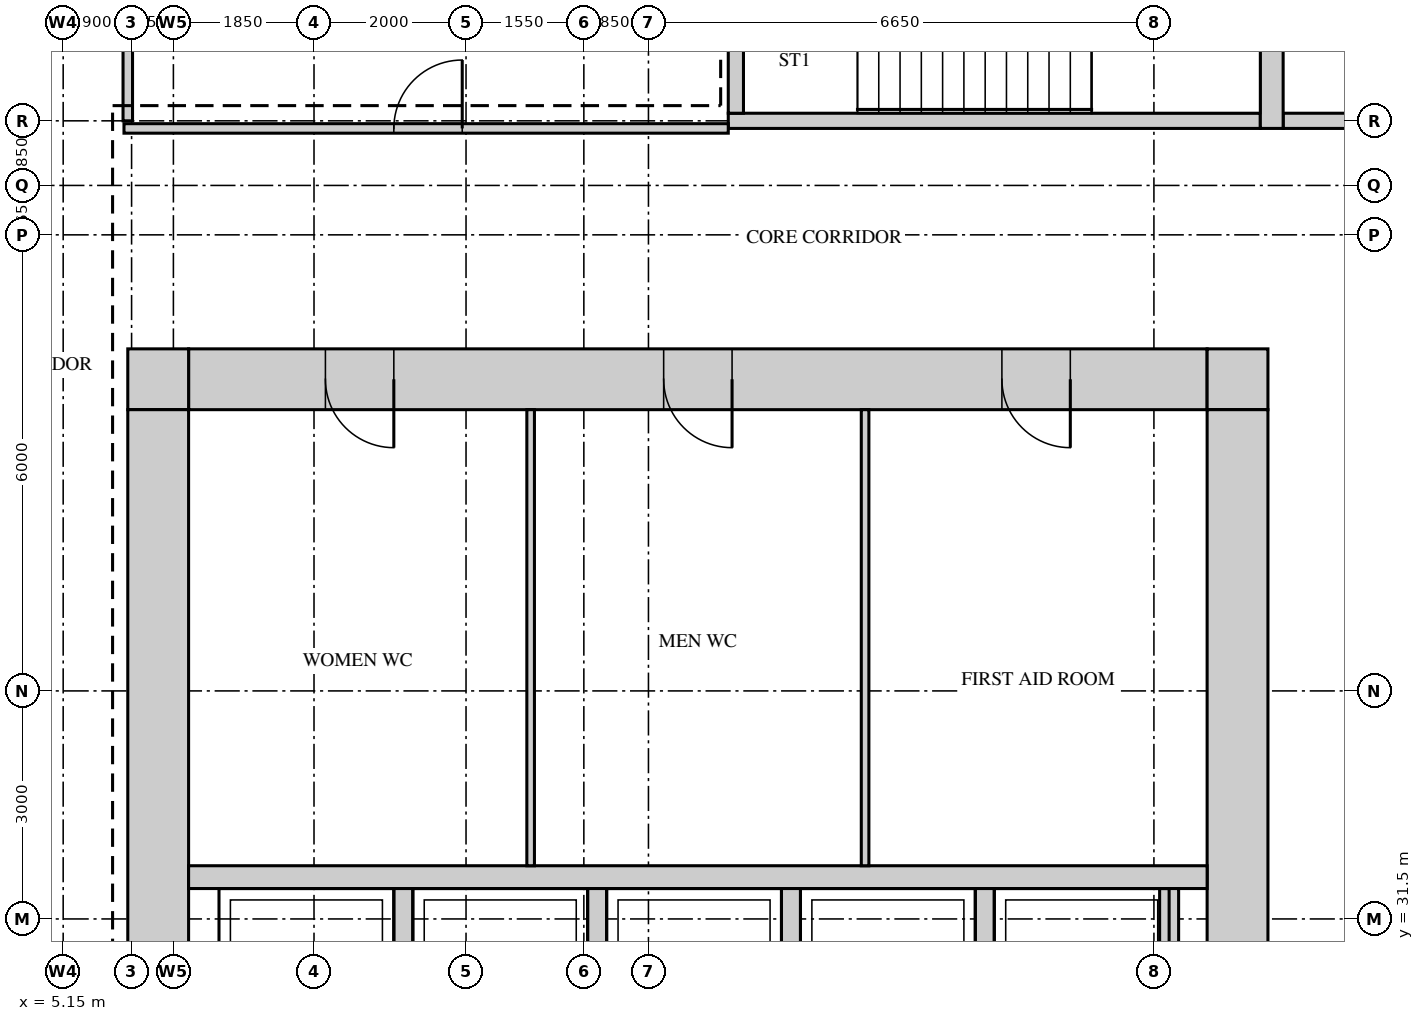
"""IFC4 building model, lengths in metres.
Left out: names, types, materials, properties, quantities, classifications, styles, units other than length and angle.
Written with IfcOpenShell. Run it as: python <this file> out.ifc"""

import sys

from ifc_helpers import new_model, si_unit, direction, frame, frame_2d, origin, place, context, subcontext, project, spatial, rectangle, extrude, source, transform, mapped, element, fill, save


model = new_model("IFC4")
c1 = context("Model", 3, precision=1e-05, world=origin(), true_north=direction((0.0, 1.0)))
c2 = subcontext(c1, "Body", "Model", "MODEL_VIEW")
j1 = project(units=[si_unit("LENGTHUNIT", "METRE"), si_unit("PLANEANGLEUNIT", "RADIAN")], contexts=[c1])
p1 = place(None, origin())
s1 = spatial("IfcSite", under=j1, at=p1, CompositionType="ELEMENT")
p2 = place(p1, origin())
s2 = spatial("IfcBuilding", under=s1, at=p2, CompositionType="ELEMENT")
p3 = place(p2, frame((0.0, 0.0, 200.7)))
s3 = spatial("IfcBuildingStorey", under=s2, at=p3, CompositionType="ELEMENT", Elevation=200.7)
m1 = source(origin(), c2, "Body", "SweptSolid", [
    extrude(rectangle(XDim=13.4, YDim=0.8, at=frame_2d((6.7, 0.0))), origin(), (0.0, 0.0, 1.0), 3.75),
])
p4 = place(p3, frame((6.8, 38.6, 0.0), z_axis=(0.0, 0.0, 1.0), x_axis=(1.0, 0.0, 0.0)))
e1 = element("IfcWall", 1, at=p4, inside=s3, PredefinedType="SHEAR", context=c2, shape_type="MappedRepresentation", body=[
    mapped(m1, transform((0.0, 0.0, 0.0))),
])
m2 = source(origin(), c2, "Body", "SweptSolid", [
    extrude(rectangle(XDim=0.9, YDim=2.1, at=frame_2d((0.45, 1.05))), frame((0.0, 0.41, 0.0), z_axis=(0.0, -1.0, 0.0), x_axis=(1.0, 0.0, 0.0)), (0.0, 0.0, 1.0), 0.82),
])
p5 = place(p4, frame((1.8, 0.0, 0.0)))
e2 = element("IfcOpeningElement", 2, at=p5, cuts=e1, PredefinedType="OPENING", context=c2, shape_type="MappedRepresentation", body=[
    mapped(m2, transform((0.0, 0.0, 0.0))),
])
p6 = place(p4, frame((6.25, 0.0, 0.0)))
e3 = element("IfcOpeningElement", 3, at=p6, cuts=e1, PredefinedType="OPENING", context=c2, shape_type="MappedRepresentation", body=[
    mapped(m2, transform((0.0, 0.0, 0.0))),
])
p7 = place(p4, frame((10.7, 0.0, 0.0)))
e4 = element("IfcOpeningElement", 4, at=p7, cuts=e1, PredefinedType="OPENING", context=c2, shape_type="MappedRepresentation", body=[
    mapped(m2, transform((0.0, 0.0, 0.0))),
])
m3 = source(origin(), c2, "Body", "SweptSolid", [
    extrude(rectangle(XDim=0.8, YDim=0.8, at=frame_2d((0.4, 0.0))), origin(), (0.0, 0.0, 1.0), 3.75),
])
for number, where, z_axis, x_axis in (
    (5, (20.2, 38.6, 0.0), (0.0, 0.0, 1.0), (1.0, 0.0, 0.0)),
    (6, (6.0, 38.6, 0.0), (0.0, 0.0, 1.0), (1.0, 0.0, 0.0)),
):
    element("IfcWall", number, at=place(p3, frame(where, z_axis=z_axis, x_axis=x_axis)), inside=s3, PredefinedType="SHEAR", context=c2, shape_type="MappedRepresentation", body=[
        mapped(m3, transform((0.0, 0.0, 0.0))),
    ])
m4 = source(origin(), c2, "Body", "SweptSolid", [
    extrude(rectangle(XDim=22.4, YDim=0.8, at=frame_2d((11.2, 0.0))), origin(), (0.0, 0.0, 1.0), 3.75),
])
p8 = place(p3, frame((20.6, 15.8, 0.0), z_axis=(0.0, 0.0, 1.0), x_axis=(0.0, 1.0, 0.0)))
e7 = element("IfcWall", 7, at=p8, inside=s3, PredefinedType="SHEAR", context=c2, shape_type="MappedRepresentation", body=[
    mapped(m4, transform((0.0, 0.0, 0.0))),
])
m5 = source(origin(), c2, "Body", "SweptSolid", [
    extrude(rectangle(XDim=1.8, YDim=2.1, at=frame_2d((0.9, 1.05))), frame((0.0, 0.41, 0.0), z_axis=(0.0, -1.0, 0.0), x_axis=(1.0, 0.0, 0.0)), (0.0, 0.0, 1.0), 0.82),
])
p9 = place(p8, frame((10.7, 0.0, 0.0)))
e8 = element("IfcOpeningElement", 8, at=p9, cuts=e7, PredefinedType="OPENING", context=c2, shape_type="MappedRepresentation", body=[
    mapped(m5, transform((0.0, 0.0, 0.0))),
])
p10 = place(p8, frame((0.35, 0.0, 0.0)))
e9 = element("IfcOpeningElement", 9, at=p10, cuts=e7, PredefinedType="OPENING", context=c2, shape_type="MappedRepresentation", body=[
    mapped(m2, transform((0.0, 0.0, 0.0))),
])
p11 = place(p8, frame((2.8, 0.0, 0.0)))
e10 = element("IfcOpeningElement", 10, at=p11, cuts=e7, PredefinedType="OPENING", context=c2, shape_type="MappedRepresentation", body=[
    mapped(m2, transform((0.0, 0.0, 0.0))),
])
m6 = source(origin(), c2, "Body", "SweptSolid", [
    extrude(rectangle(XDim=1.0, YDim=2.1, at=frame_2d((0.5, 1.05))), frame((0.0, 0.41, 0.0), z_axis=(0.0, -1.0, 0.0), x_axis=(1.0, 0.0, 0.0)), (0.0, 0.0, 1.0), 0.82),
])
p12 = place(p8, frame((5.5, 0.0, 0.0)))
e11 = element("IfcOpeningElement", 11, at=p12, cuts=e7, PredefinedType="OPENING", context=c2, shape_type="MappedRepresentation", body=[
    mapped(m6, transform((0.0, 0.0, 0.0))),
])
p13 = place(p3, frame((6.4, 15.8, 0.0), z_axis=(0.0, 0.0, 1.0), x_axis=(0.0, 1.0, 0.0)))
e12 = element("IfcWall", 12, at=p13, inside=s3, PredefinedType="SHEAR", context=c2, shape_type="MappedRepresentation", body=[
    mapped(m4, transform((0.0, 0.0, 0.0))),
])
m7 = source(origin(), c2, "Body", "SweptSolid", [
    extrude(rectangle(XDim=7.0, YDim=0.2, at=frame_2d((3.5, 0.0))), origin(), (0.0, 0.0, 1.0), 3.75),
])
p14 = place(p3, frame((13.9, 42.0, 0.0), z_axis=(0.0, 0.0, 1.0), x_axis=(1.0, 0.0, 0.0)))
e13 = element("IfcWall", 13, at=p14, inside=s3, PredefinedType="SHEAR", context=c2, shape_type="MappedRepresentation", body=[
    mapped(m7, transform((0.0, 0.0, 0.0))),
])
m8 = source(origin(), c2, "Body", "SweptSolid", [
    extrude(rectangle(XDim=7.1, YDim=0.2, at=frame_2d((3.55, 0.0))), origin(), (0.0, 0.0, 1.0), 3.75),
])
p15 = place(p3, frame((21.2, 42.0, 0.0), z_axis=(0.0, 0.0, 1.0), x_axis=(1.0, 0.0, 0.0)))
e14 = element("IfcWall", 14, at=p15, inside=s3, PredefinedType="SHEAR", context=c2, shape_type="MappedRepresentation", body=[
    mapped(m8, transform((0.0, 0.0, 0.0))),
])
m9 = source(origin(), c2, "Body", "SweptSolid", [
    extrude(rectangle(XDim=3.75, YDim=0.3, at=frame_2d((1.875, 0.0))), origin(), (0.0, 0.0, 1.0), 3.75),
])
p16 = place(p3, frame((21.05, 41.9, 0.0), z_axis=(0.0, 0.0, 1.0), x_axis=(0.0, 1.0, 0.0)))
e15 = element("IfcWall", 15, at=p16, inside=s3, PredefinedType="SHEAR", context=c2, shape_type="MappedRepresentation", body=[
    mapped(m9, transform((0.0, 0.0, 0.0))),
])
m10 = source(origin(), c2, "Body", "SweptSolid", [
    extrude(rectangle(XDim=3.35, YDim=0.2, at=frame_2d((1.675, 0.0))), origin(), (0.0, 0.0, 1.0), 3.75),
])
p17 = place(p3, frame((14.0, 42.1, 0.0), z_axis=(0.0, 0.0, 1.0), x_axis=(0.0, 1.0, 0.0)))
e16 = element("IfcWall", 16, at=p17, inside=s3, PredefinedType="SHEAR", context=c2, shape_type="MappedRepresentation", body=[
    mapped(m10, transform((0.0, 0.0, 0.0))),
])
m11 = source(origin(), c2, "Body", "SweptSolid", [
    extrude(rectangle(XDim=13.4, YDim=0.3, at=frame_2d((6.7, 0.0))), origin(), (0.0, 0.0, 1.0), 3.75),
])
p18 = place(p3, frame((6.8, 32.05, 0.0), z_axis=(0.0, 0.0, 1.0), x_axis=(1.0, 0.0, 0.0)))
e17 = element("IfcWall", 17, at=p18, inside=s3, PredefinedType="STANDARD", context=c2, shape_type="MappedRepresentation", body=[
    mapped(m11, transform((0.0, 0.0, 0.0))),
])
m12 = source(origin(), c2, "Body", "SweptSolid", [
    extrude(rectangle(XDim=2.4, YDim=0.25, at=frame_2d((1.2, 0.0))), origin(), (0.0, 0.0, 1.0), 3.75),
])
for number, where, z_axis, x_axis in (
    (18, (17.275, 29.5, 0.0), (0.0, 0.0, 1.0), (0.0, 1.0, 0.0)),
    (19, (19.7, 29.5, 0.0), (0.0, 0.0, 1.0), (0.0, 1.0, 0.0)),
    (20, (9.625, 29.5, 0.0), (0.0, 0.0, 1.0), (0.0, 1.0, 0.0)),
    (21, (12.175, 29.5, 0.0), (0.0, 0.0, 1.0), (0.0, 1.0, 0.0)),
    (22, (14.725, 29.5, 0.0), (0.0, 0.0, 1.0), (0.0, 1.0, 0.0)),
):
    element("IfcWall", number, at=place(p3, frame(where, z_axis=z_axis, x_axis=x_axis)), inside=s3, PredefinedType="STANDARD", context=c2, shape_type="MappedRepresentation", body=[
        mapped(m12, transform((0.0, 0.0, 0.0))),
    ])
m13 = source(origin(), c2, "Body", "SweptSolid", [
    extrude(rectangle(XDim=6.0, YDim=0.1, at=frame_2d((3.0, 0.0))), origin(), (0.0, 0.0, 1.0), 3.8),
])
for number, where, z_axis, x_axis in (
    (23, (11.3, 32.2, 0.0), (0.0, 0.0, 1.0), (0.0, 1.0, 0.0)),
    (24, (15.7, 32.2, 0.0), (0.0, 0.0, 1.0), (0.0, 1.0, 0.0)),
):
    element("IfcWall", number, at=place(p3, frame(where, z_axis=z_axis, x_axis=x_axis)), inside=s3, PredefinedType="PARTITIONING", context=c2, shape_type="MappedRepresentation", body=[
        mapped(m13, transform((0.0, 0.0, 0.0))),
    ])
m14 = source(origin(), c2, "Body", "SweptSolid", [
    extrude(rectangle(XDim=7.95, YDim=0.125, at=frame_2d((3.975, 0.0))), origin(), (0.0, 0.0, 1.0), 3.8),
])
p19 = place(p3, frame((5.95, 41.9, 0.0), z_axis=(0.0, 0.0, 1.0), x_axis=(1.0, 0.0, 0.0)))
e25 = element("IfcWall", 25, at=p19, inside=s3, PredefinedType="PARTITIONING", context=c2, shape_type="MappedRepresentation", body=[
    mapped(m14, transform((0.0, 0.0, 0.0))),
])
m15 = source(origin(), c2, "Body", "SweptSolid", [
    extrude(rectangle(XDim=0.9, YDim=2.1, at=frame_2d((0.45, 1.05))), frame((0.0, 0.073, 0.0), z_axis=(0.0, -1.0, 0.0), x_axis=(1.0, 0.0, 0.0)), (0.0, 0.0, 1.0), 0.145),
])
p20 = place(p19, frame((3.55, 0.0, 0.0)))
e26 = element("IfcOpeningElement", 26, at=p20, cuts=e25, PredefinedType="OPENING", context=c2, shape_type="MappedRepresentation", body=[
    mapped(m15, transform((0.0, 0.0, 0.0))),
])
m16 = source(origin(), c2, "Body", "SweptSolid", [
    extrude(rectangle(XDim=3.45, YDim=0.125, at=frame_2d((1.725, 0.0))), origin(), (0.0, 0.0, 1.0), 3.8),
])
p21 = place(p3, frame((6.0, 42.0, 0.0), z_axis=(0.0, 0.0, 1.0), x_axis=(0.0, 1.0, 0.0)))
e27 = element("IfcWall", 27, at=p21, inside=s3, PredefinedType="PARTITIONING", context=c2, shape_type="MappedRepresentation", body=[
    mapped(m16, transform((0.0, 0.0, 0.0))),
])
m17 = source(origin(), c2, "Body", "SweptSolid", [
    extrude(rectangle(XDim=0.9, YDim=2.1, at=frame_2d((0.45, 1.05))), frame((0.0, 0.35, 0.0), z_axis=(0.0, -1.0, 0.0), x_axis=(1.0, 0.0, 0.0)), (0.0, 0.0, 1.0), 0.7),
])
p22 = place(p5, origin())
e28 = element("IfcDoor", 28, at=p22, inside=s3, OperationType="SINGLE_SWING_RIGHT", PredefinedType="DOOR", context=c2, shape_type="MappedRepresentation", body=[
    mapped(m17, transform((0.0, 0.0, 0.0))),
])
fill(e2, e28)
p23 = place(p6, origin())
e29 = element("IfcDoor", 29, at=p23, inside=s3, OperationType="SINGLE_SWING_RIGHT", PredefinedType="DOOR", context=c2, shape_type="MappedRepresentation", body=[
    mapped(m17, transform((0.0, 0.0, 0.0))),
])
fill(e3, e29)
p24 = place(p7, origin())
e30 = element("IfcDoor", 30, at=p24, inside=s3, OperationType="SINGLE_SWING_RIGHT", PredefinedType="DOOR", context=c2, shape_type="MappedRepresentation", body=[
    mapped(m17, transform((0.0, 0.0, 0.0))),
])
fill(e4, e30)
m18 = source(origin(), c2, "Body", "SweptSolid", [
    extrude(rectangle(XDim=0.9, YDim=2.1, at=frame_2d((0.45, 1.05))), frame((0.0, 0.025, 0.0), z_axis=(0.0, -1.0, 0.0), x_axis=(1.0, 0.0, 0.0)), (0.0, 0.0, 1.0), 0.05),
])
p25 = place(p20, origin())
e31 = element("IfcDoor", 31, at=p25, inside=s3, OperationType="SINGLE_SWING_LEFT", PredefinedType="DOOR", context=c2, shape_type="MappedRepresentation", body=[
    mapped(m18, transform((0.0, 0.0, 0.0))),
])
fill(e26, e31)
save(model, sys.argv[1])
